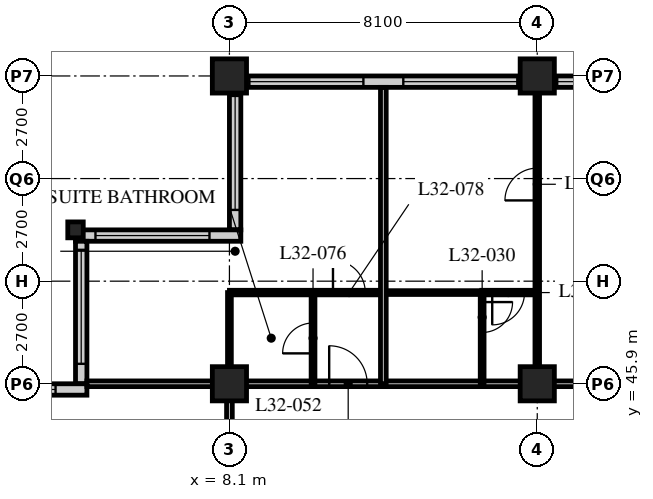
"""IFC4 building model, lengths in metres.
Left out: names, types, materials, properties, quantities, classifications, styles, units other than length and angle.
Written with IfcOpenShell. Run it as: python <this file> out.ifc"""

import sys

from ifc_helpers import new_model, si_unit, direction, frame, frame_2d, origin, origin_2d, place, context, subcontext, project, spatial, rectangle, hollow_rectangle, i_section, extrude, element, fill, save


model = new_model("IFC4")
c1 = context("Model", 3, precision=1e-05, world=origin(), true_north=direction((0.0, 1.0)))
c2 = subcontext(c1, "Body", "Model", "MODEL_VIEW")
j1 = project(units=[si_unit("LENGTHUNIT", "METRE"), si_unit("PLANEANGLEUNIT", "RADIAN")], contexts=[c1])
p1 = place(None, origin())
s1 = spatial("IfcSite", under=j1, at=p1, CompositionType="ELEMENT")
p2 = place(p1, origin())
s2 = spatial("IfcBuilding", under=s1, at=p2, CompositionType="ELEMENT")
p3 = place(p2, frame((0.0, 0.0, 127.2)))
s3 = spatial("IfcBuildingStorey", under=s2, at=p3, CompositionType="ELEMENT", Elevation=127.2)
p4 = place(p3, frame((4.05, 49.95, 0.0), z_axis=(0.0, 0.0, 1.0), x_axis=(1.0, 0.0, 0.0)))
e1 = element("IfcColumn", 1, at=p4, inside=s3, PredefinedType="COLUMN", context=c2, shape_type="SweptSolid", body=[
    extrude(i_section(OverallWidth=0.407, OverallDepth=0.419, WebThickness=0.031, FlangeThickness=0.049, FilletRadius=0.015, at=origin_2d()), origin(), (0.0, 0.0, 1.0), 3.4),
])
for number, where, z_axis, x_axis in (
    (2, (8.1, 45.9, 0.0), (0.0, 0.0, 1.0), (1.0, 0.0, 0.0)),
    (3, (8.1, 54.0, 0.0), (0.0, 0.0, 1.0), (1.0, 0.0, 0.0)),
    (4, (16.2, 45.9, 0.0), (0.0, 0.0, 1.0), (1.0, 0.0, 0.0)),
    (5, (16.2, 54.0, 0.0), (0.0, 0.0, 1.0), (1.0, 0.0, 0.0)),
):
    element("IfcColumn", number, at=place(p3, frame(where, z_axis=z_axis, x_axis=x_axis)), inside=s3, PredefinedType="COLUMN", context=c2, shape_type="SweptSolid", body=[
        extrude(hollow_rectangle(XDim=0.9, YDim=0.9, WallThickness=0.09, at=origin_2d()), origin(), (0.0, 0.0, 1.0), 3.4),
    ])
p5 = place(p3, frame((48.3, 53.85, 0.0), z_axis=(0.0, 0.0, 1.0), x_axis=(-1.0, 0.0, 0.0)))
e6 = element("IfcWall", 6, at=p5, inside=s3, PredefinedType="SOLIDWALL", context=c2, shape_type="SweptSolid", body=[
    extrude(rectangle(XDim=40.2, YDim=0.3, at=frame_2d((20.1, 0.0))), origin(), (0.0, 0.0, 1.0), 3.19),
])
p6 = place(p5, frame((0.225, 0.0, 0.9)))
e7 = element("IfcOpeningElement", 7, at=p6, cuts=e6, PredefinedType="OPENING", context=c2, shape_type="SweptSolid", body=[
    extrude(rectangle(XDim=3.0, YDim=2.0, at=frame_2d((1.5, 1.0))), frame((0.0, 0.16, 0.0), z_axis=(0.0, -1.0, 0.0), x_axis=(1.0, 0.0, 0.0)), (0.0, 0.0, 1.0), 0.32),
])
p7 = place(p5, frame((4.275, 0.0, 0.9)))
e8 = element("IfcOpeningElement", 8, at=p7, cuts=e6, PredefinedType="OPENING", context=c2, shape_type="SweptSolid", body=[
    extrude(rectangle(XDim=3.0, YDim=2.0, at=frame_2d((1.5, 1.0))), frame((0.0, 0.16, 0.0), z_axis=(0.0, -1.0, 0.0), x_axis=(1.0, 0.0, 0.0)), (0.0, 0.0, 1.0), 0.32),
])
p8 = place(p5, frame((8.325, 0.0, 0.9)))
e9 = element("IfcOpeningElement", 9, at=p8, cuts=e6, PredefinedType="OPENING", context=c2, shape_type="SweptSolid", body=[
    extrude(rectangle(XDim=3.0, YDim=2.0, at=frame_2d((1.5, 1.0))), frame((0.0, 0.16, 0.0), z_axis=(0.0, -1.0, 0.0), x_axis=(1.0, 0.0, 0.0)), (0.0, 0.0, 1.0), 0.32),
])
p9 = place(p5, frame((12.375, 0.0, 0.9)))
e10 = element("IfcOpeningElement", 10, at=p9, cuts=e6, PredefinedType="OPENING", context=c2, shape_type="SweptSolid", body=[
    extrude(rectangle(XDim=3.0, YDim=2.0, at=frame_2d((1.5, 1.0))), frame((0.0, 0.16, 0.0), z_axis=(0.0, -1.0, 0.0), x_axis=(1.0, 0.0, 0.0)), (0.0, 0.0, 1.0), 0.32),
])
p10 = place(p5, frame((16.425, 0.0, 0.9)))
e11 = element("IfcOpeningElement", 11, at=p10, cuts=e6, PredefinedType="OPENING", context=c2, shape_type="SweptSolid", body=[
    extrude(rectangle(XDim=3.0, YDim=2.0, at=frame_2d((1.5, 1.0))), frame((0.0, 0.16, 0.0), z_axis=(0.0, -1.0, 0.0), x_axis=(1.0, 0.0, 0.0)), (0.0, 0.0, 1.0), 0.32),
])
p11 = place(p5, frame((20.475, 0.0, 0.9)))
e12 = element("IfcOpeningElement", 12, at=p11, cuts=e6, PredefinedType="OPENING", context=c2, shape_type="SweptSolid", body=[
    extrude(rectangle(XDim=3.0, YDim=2.0, at=frame_2d((1.5, 1.0))), frame((0.0, 0.16, 0.0), z_axis=(0.0, -1.0, 0.0), x_axis=(1.0, 0.0, 0.0)), (0.0, 0.0, 1.0), 0.32),
])
p12 = place(p5, frame((24.525, 0.0, 0.9)))
e13 = element("IfcOpeningElement", 13, at=p12, cuts=e6, PredefinedType="OPENING", context=c2, shape_type="SweptSolid", body=[
    extrude(rectangle(XDim=3.0, YDim=2.0, at=frame_2d((1.5, 1.0))), frame((0.0, 0.16, 0.0), z_axis=(0.0, -1.0, 0.0), x_axis=(1.0, 0.0, 0.0)), (0.0, 0.0, 1.0), 0.32),
])
p13 = place(p5, frame((28.575, 0.0, 0.9)))
e14 = element("IfcOpeningElement", 14, at=p13, cuts=e6, PredefinedType="OPENING", context=c2, shape_type="SweptSolid", body=[
    extrude(rectangle(XDim=3.0, YDim=2.0, at=frame_2d((1.5, 1.0))), frame((0.0, 0.16, 0.0), z_axis=(0.0, -1.0, 0.0), x_axis=(1.0, 0.0, 0.0)), (0.0, 0.0, 1.0), 0.32),
])
p14 = place(p5, frame((32.625, 0.0, 0.9)))
e15 = element("IfcOpeningElement", 15, at=p14, cuts=e6, PredefinedType="OPENING", context=c2, shape_type="SweptSolid", body=[
    extrude(rectangle(XDim=3.0, YDim=2.0, at=frame_2d((1.5, 1.0))), frame((0.0, 0.16, 0.0), z_axis=(0.0, -1.0, 0.0), x_axis=(1.0, 0.0, 0.0)), (0.0, 0.0, 1.0), 0.32),
])
p15 = place(p5, frame((36.675, 0.0, 0.9)))
e16 = element("IfcOpeningElement", 16, at=p15, cuts=e6, PredefinedType="OPENING", context=c2, shape_type="SweptSolid", body=[
    extrude(rectangle(XDim=3.0, YDim=2.0, at=frame_2d((1.5, 1.0))), frame((0.0, 0.16, 0.0), z_axis=(0.0, -1.0, 0.0), x_axis=(1.0, 0.0, 0.0)), (0.0, 0.0, 1.0), 0.32),
])
p16 = place(p3, frame((8.25, 53.7, 0.0), z_axis=(0.0, 0.0, 1.0), x_axis=(0.0, -1.0, 0.0)))
e17 = element("IfcWall", 17, at=p16, inside=s3, PredefinedType="SOLIDWALL", context=c2, shape_type="SweptSolid", body=[
    extrude(rectangle(XDim=3.75, YDim=0.3, at=frame_2d((1.875, 0.0))), origin(), (0.0, 0.0, 1.0), 3.19),
])
p17 = place(p16, frame((0.225, 0.0, 0.9)))
e18 = element("IfcOpeningElement", 18, at=p17, cuts=e17, PredefinedType="OPENING", context=c2, shape_type="SweptSolid", body=[
    extrude(rectangle(XDim=3.0, YDim=1.5, at=frame_2d((1.5, 0.75))), frame((0.0, 0.16, 0.0), z_axis=(0.0, -1.0, 0.0), x_axis=(1.0, 0.0, 0.0)), (0.0, 0.0, 1.0), 0.32),
])
p18 = place(p3, frame((8.4, 49.8, 0.0), z_axis=(0.0, 0.0, 1.0), x_axis=(-1.0, 0.0, 0.0)))
e19 = element("IfcWall", 19, at=p18, inside=s3, PredefinedType="SOLIDWALL", context=c2, shape_type="SweptSolid", body=[
    extrude(rectangle(XDim=4.35, YDim=0.3, at=frame_2d((2.175, 0.0))), origin(), (0.0, 0.0, 1.0), 3.19),
])
p19 = place(p18, frame((0.825, 0.0, 0.9)))
e20 = element("IfcOpeningElement", 20, at=p19, cuts=e19, PredefinedType="OPENING", context=c2, shape_type="SweptSolid", body=[
    extrude(rectangle(XDim=3.0, YDim=1.5, at=frame_2d((1.5, 0.75))), frame((0.0, 0.16, 0.0), z_axis=(0.0, -1.0, 0.0), x_axis=(1.0, 0.0, 0.0)), (0.0, 0.0, 1.0), 0.32),
])
p20 = place(p3, frame((4.2, 49.65, 0.0), z_axis=(0.0, 0.0, 1.0), x_axis=(0.0, -1.0, 0.0)))
e21 = element("IfcWall", 21, at=p20, inside=s3, PredefinedType="SOLIDWALL", context=c2, shape_type="SweptSolid", body=[
    extrude(rectangle(XDim=3.75, YDim=0.3, at=frame_2d((1.875, 0.0))), origin(), (0.0, 0.0, 1.0), 3.19),
])
p21 = place(p20, frame((0.225, 0.0, 0.9)))
e22 = element("IfcOpeningElement", 22, at=p21, cuts=e21, PredefinedType="OPENING", context=c2, shape_type="SweptSolid", body=[
    extrude(rectangle(XDim=3.0, YDim=1.5, at=frame_2d((1.5, 0.75))), frame((0.0, 0.16, 0.0), z_axis=(0.0, -1.0, 0.0), x_axis=(1.0, 0.0, 0.0)), (0.0, 0.0, 1.0), 0.32),
])
p22 = place(p3, frame((4.35, 45.75, 0.0), z_axis=(0.0, 0.0, 1.0), x_axis=(-1.0, 0.0, 0.0)))
e23 = element("IfcWall", 23, at=p22, inside=s3, PredefinedType="SOLIDWALL", context=c2, shape_type="SweptSolid", body=[
    extrude(rectangle(XDim=4.35, YDim=0.3, at=frame_2d((2.175, 0.0))), origin(), (0.0, 0.0, 1.0), 3.19),
])
p23 = place(p22, frame((0.825, 0.0, 0.9)))
e24 = element("IfcOpeningElement", 24, at=p23, cuts=e23, PredefinedType="OPENING", context=c2, shape_type="SweptSolid", body=[
    extrude(rectangle(XDim=3.0, YDim=1.5, at=frame_2d((1.5, 0.75))), frame((0.0, 0.16, 0.0), z_axis=(0.0, -1.0, 0.0), x_axis=(1.0, 0.0, 0.0)), (0.0, 0.0, 1.0), 0.32),
])
p24 = place(p3, frame((8.1, 45.9, 0.0), z_axis=(0.0, 0.0, 1.0), x_axis=(1.0, 0.0, 0.0)))
e25 = element("IfcWall", 25, at=p24, inside=s3, PredefinedType="PARTITIONING", context=c2, shape_type="SweptSolid", body=[
    extrude(rectangle(XDim=40.5, YDim=0.15, at=frame_2d((20.25, 0.0))), origin(), (0.0, 0.0, 1.0), 2.578),
])
p25 = place(p24, frame((9.625, 0.0, 0.0)))
e26 = element("IfcOpeningElement", 26, at=p25, cuts=e25, PredefinedType="OPENING", context=c2, shape_type="SweptSolid", body=[
    extrude(rectangle(XDim=1.0, YDim=2.1, at=frame_2d((0.5, 1.05))), frame((0.0, 0.085, 0.0), z_axis=(0.0, -1.0, 0.0), x_axis=(1.0, 0.0, 0.0)), (0.0, 0.0, 1.0), 0.17),
])
p26 = place(p24, frame((21.65, 0.0, 0.0)))
e27 = element("IfcOpeningElement", 27, at=p26, cuts=e25, PredefinedType="OPENING", context=c2, shape_type="SweptSolid", body=[
    extrude(rectangle(XDim=1.0, YDim=2.1, at=frame_2d((0.5, 1.05))), frame((0.0, 0.085, 0.0), z_axis=(0.0, -1.0, 0.0), x_axis=(1.0, 0.0, 0.0)), (0.0, 0.0, 1.0), 0.17),
])
p27 = place(p24, frame((26.75, 0.0, 0.0)))
e28 = element("IfcOpeningElement", 28, at=p27, cuts=e25, PredefinedType="OPENING", context=c2, shape_type="SweptSolid", body=[
    extrude(rectangle(XDim=1.0, YDim=2.1, at=frame_2d((0.5, 1.05))), frame((0.0, 0.085, 0.0), z_axis=(0.0, -1.0, 0.0), x_axis=(1.0, 0.0, 0.0)), (0.0, 0.0, 1.0), 0.17),
])
p28 = place(p24, frame((28.95, 0.0, 0.0)))
e29 = element("IfcOpeningElement", 29, at=p28, cuts=e25, PredefinedType="OPENING", context=c2, shape_type="SweptSolid", body=[
    extrude(rectangle(XDim=1.0, YDim=2.1, at=frame_2d((0.5, 1.05))), frame((0.0, 0.085, 0.0), z_axis=(0.0, -1.0, 0.0), x_axis=(1.0, 0.0, 0.0)), (0.0, 0.0, 1.0), 0.17),
])
p29 = place(p24, frame((34.85, 0.0, 0.0)))
e30 = element("IfcOpeningElement", 30, at=p29, cuts=e25, PredefinedType="OPENING", context=c2, shape_type="SweptSolid", body=[
    extrude(rectangle(XDim=1.0, YDim=2.1, at=frame_2d((0.5, 1.05))), frame((0.0, 0.085, 0.0), z_axis=(0.0, -1.0, 0.0), x_axis=(1.0, 0.0, 0.0)), (0.0, 0.0, 1.0), 0.17),
])
p30 = place(p24, frame((36.875, 0.0, 0.0)))
e31 = element("IfcOpeningElement", 31, at=p30, cuts=e25, PredefinedType="OPENING", context=c2, shape_type="SweptSolid", body=[
    extrude(rectangle(XDim=1.0, YDim=2.1, at=frame_2d((0.5, 1.05))), frame((0.0, 0.085, 0.0), z_axis=(0.0, -1.0, 0.0), x_axis=(1.0, 0.0, 0.0)), (0.0, 0.0, 1.0), 0.17),
])
p31 = place(p24, frame((2.625, 0.0, 0.0)))
e32 = element("IfcOpeningElement", 32, at=p31, cuts=e25, PredefinedType="OPENING", context=c2, shape_type="SweptSolid", body=[
    extrude(rectangle(XDim=1.0, YDim=2.1, at=frame_2d((0.5, 1.05))), frame((0.0, 0.085, 0.0), z_axis=(0.0, -1.0, 0.0), x_axis=(1.0, 0.0, 0.0)), (0.0, 0.0, 1.0), 0.17),
])
p32 = place(p3, frame((8.1, 21.6, 0.0), z_axis=(0.0, 0.0, 1.0), x_axis=(0.0, 1.0, 0.0)))
e33 = element("IfcWall", 33, at=p32, inside=s3, PredefinedType="PARTITIONING", context=c2, shape_type="SweptSolid", body=[
    extrude(rectangle(XDim=24.3, YDim=0.15, at=frame_2d((12.15, 0.0))), origin(), (0.0, 0.0, 1.0), 2.578),
])
p33 = place(p32, frame((5.45, 0.0, 0.0)))
e34 = element("IfcOpeningElement", 34, at=p33, cuts=e33, PredefinedType="OPENING", context=c2, shape_type="SweptSolid", body=[
    extrude(rectangle(XDim=1.0, YDim=2.1, at=frame_2d((0.5, 1.05))), frame((0.0, 0.085, 0.0), z_axis=(0.0, -1.0, 0.0), x_axis=(1.0, 0.0, 0.0)), (0.0, 0.0, 1.0), 0.17),
])
p34 = place(p32, frame((10.0, 0.0, 0.0)))
e35 = element("IfcOpeningElement", 35, at=p34, cuts=e33, PredefinedType="OPENING", context=c2, shape_type="SweptSolid", body=[
    extrude(rectangle(XDim=1.0, YDim=2.1, at=frame_2d((0.5, 1.05))), frame((0.0, 0.085, 0.0), z_axis=(0.0, -1.0, 0.0), x_axis=(1.0, 0.0, 0.0)), (0.0, 0.0, 1.0), 0.17),
])
p35 = place(p32, frame((21.65, 0.0, 0.0)))
e36 = element("IfcOpeningElement", 36, at=p35, cuts=e33, PredefinedType="OPENING", context=c2, shape_type="SweptSolid", body=[
    extrude(rectangle(XDim=1.0, YDim=2.1, at=frame_2d((0.5, 1.05))), frame((0.0, 0.085, 0.0), z_axis=(0.0, -1.0, 0.0), x_axis=(1.0, 0.0, 0.0)), (0.0, 0.0, 1.0), 0.17),
])
p36 = place(p3, frame((12.15, 48.3, 0.0), z_axis=(0.0, 0.0, 1.0), x_axis=(1.0, 0.0, 0.0)))
e37 = element("IfcWall", 37, at=p36, inside=s3, PredefinedType="PARTITIONING", context=c2, shape_type="SweptSolid", body=[
    extrude(rectangle(XDim=2.6, YDim=0.1, at=frame_2d((1.3, 0.0))), origin(), (0.0, 0.0, 1.0), 3.19),
])
p37 = place(p3, frame((14.75, 45.9, 0.0), z_axis=(0.0, 0.0, 1.0), x_axis=(0.0, 1.0, 0.0)))
e38 = element("IfcWall", 38, at=p37, inside=s3, PredefinedType="PARTITIONING", context=c2, shape_type="SweptSolid", body=[
    extrude(rectangle(XDim=2.4, YDim=0.1, at=frame_2d((1.2, 0.0))), origin(), (0.0, 0.0, 1.0), 3.19),
])
p38 = place(p37, frame((1.35, 0.0, 0.0)))
e39 = element("IfcOpeningElement", 39, at=p38, cuts=e38, PredefinedType="OPENING", context=c2, shape_type="SweptSolid", body=[
    extrude(rectangle(XDim=0.8, YDim=2.1, at=frame_2d((0.4, 1.05))), frame((0.0, 0.06, 0.0), z_axis=(0.0, -1.0, 0.0), x_axis=(1.0, 0.0, 0.0)), (0.0, 0.0, 1.0), 0.12),
])
p39 = place(p3, frame((16.2, 45.9, 0.0), z_axis=(0.0, 0.0, 1.0), x_axis=(0.0, 1.0, 0.0)))
e40 = element("IfcWall", 40, at=p39, inside=s3, PredefinedType="PARTITIONING", context=c2, shape_type="SweptSolid", body=[
    extrude(rectangle(XDim=7.8, YDim=0.12, at=frame_2d((3.9, 0.0))), origin(), (0.0, 0.0, 1.0), 2.578),
])
p40 = place(p39, frame((4.825, 0.0, 0.0)))
e41 = element("IfcOpeningElement", 41, at=p40, cuts=e40, PredefinedType="OPENING", context=c2, shape_type="SweptSolid", body=[
    extrude(rectangle(XDim=0.85, YDim=2.1, at=frame_2d((0.425, 1.05))), frame((0.0, 0.07, 0.0), z_axis=(0.0, -1.0, 0.0), x_axis=(1.0, 0.0, 0.0)), (0.0, 0.0, 1.0), 0.14),
])
p41 = place(p3, frame((8.1, 48.3, 0.0), z_axis=(0.0, 0.0, 1.0), x_axis=(1.0, 0.0, 0.0)))
e42 = element("IfcWall", 42, at=p41, inside=s3, PredefinedType="PARTITIONING", context=c2, shape_type="SweptSolid", body=[
    extrude(rectangle(XDim=4.05, YDim=0.12, at=frame_2d((2.025, 0.0))), origin(), (0.0, 0.0, 1.0), 3.19),
])
p42 = place(p41, frame((2.725, 0.0, 0.0)))
e43 = element("IfcOpeningElement", 43, at=p42, cuts=e42, PredefinedType="OPENING", context=c2, shape_type="SweptSolid", body=[
    extrude(rectangle(XDim=0.85, YDim=2.1, at=frame_2d((0.425, 1.05))), frame((0.0, 0.07, 0.0), z_axis=(0.0, -1.0, 0.0), x_axis=(1.0, 0.0, 0.0)), (0.0, 0.0, 1.0), 0.14),
])
p43 = place(p3, frame((10.3, 45.9, 0.0), z_axis=(0.0, 0.0, 1.0), x_axis=(0.0, 1.0, 0.0)))
e44 = element("IfcWall", 44, at=p43, inside=s3, PredefinedType="PARTITIONING", context=c2, shape_type="SweptSolid", body=[
    extrude(rectangle(XDim=2.4, YDim=0.1, at=frame_2d((1.2, 0.0))), origin(), (0.0, 0.0, 1.0), 3.19),
])
p44 = place(p43, frame((0.8, 0.0, 0.0)))
e45 = element("IfcOpeningElement", 45, at=p44, cuts=e44, PredefinedType="OPENING", context=c2, shape_type="SweptSolid", body=[
    extrude(rectangle(XDim=0.8, YDim=2.1, at=frame_2d((0.4, 1.05))), frame((0.0, 0.06, 0.0), z_axis=(0.0, -1.0, 0.0), x_axis=(1.0, 0.0, 0.0)), (0.0, 0.0, 1.0), 0.12),
])
p45 = place(p3, frame((8.1, 45.9, 0.0), z_axis=(0.0, 0.0, 1.0), x_axis=(0.0, 1.0, 0.0)))
e46 = element("IfcWall", 46, at=p45, inside=s3, PredefinedType="PARTITIONING", context=c2, shape_type="SweptSolid", body=[
    extrude(rectangle(XDim=2.4, YDim=0.1, at=frame_2d((1.2, 0.0))), origin(), (0.0, 0.0, 1.0), 2.578),
])
p46 = place(p3, frame((4.35, 45.9, 0.0), z_axis=(0.0, 0.0, 1.0), x_axis=(1.0, 0.0, 0.0)))
e47 = element("IfcWall", 47, at=p46, inside=s3, PredefinedType="PARTITIONING", context=c2, shape_type="SweptSolid", body=[
    extrude(rectangle(XDim=3.75, YDim=0.15, at=frame_2d((1.875, 0.0))), origin(), (0.0, 0.0, 1.0), 2.578),
])
p47 = place(p3, frame((12.15, 45.9, 0.0), z_axis=(0.0, 0.0, 1.0), x_axis=(0.0, 1.0, 0.0)))
e48 = element("IfcWall", 48, at=p47, inside=s3, PredefinedType="PARTITIONING", context=c2, shape_type="SweptSolid", body=[
    extrude(rectangle(XDim=7.8, YDim=0.15, at=frame_2d((3.9, 0.0))), origin(), (0.0, 0.0, 1.0), 3.19),
])
p48 = place(p3, frame((14.74, 48.3, 0.0), z_axis=(0.0, 0.0, 1.0), x_axis=(1.0, 0.0, 0.0)))
e49 = element("IfcWall", 49, at=p48, inside=s3, PredefinedType="PARTITIONING", context=c2, shape_type="SweptSolid", body=[
    extrude(rectangle(XDim=1.46, YDim=0.12, at=frame_2d((0.73, 0.0))), origin(), (0.0, 0.0, 1.0), 3.19),
])
p49 = place(p48, frame((0.275, 0.0, 0.0)))
e50 = element("IfcOpeningElement", 50, at=p49, cuts=e49, PredefinedType="OPENING", context=c2, shape_type="SweptSolid", body=[
    extrude(rectangle(XDim=0.85, YDim=2.1, at=frame_2d((0.425, 1.05))), frame((0.0, 0.07, 0.0), z_axis=(0.0, -1.0, 0.0), x_axis=(1.0, 0.0, 0.0)), (0.0, 0.0, 1.0), 0.14),
])
p50 = place(p13, origin())
e51 = element("IfcWindow", 51, at=p50, inside=s3, PartitioningType="SINGLE_PANEL", PredefinedType="WINDOW", context=c2, shape_type="SweptSolid", body=[
    extrude(rectangle(XDim=3.0, YDim=2.0, at=frame_2d((1.5, 1.0))), frame((0.0, 0.03, 0.0), z_axis=(0.0, -1.0, 0.0), x_axis=(1.0, 0.0, 0.0)), (0.0, 0.0, 1.0), 0.06),
])
fill(e14, e51)
p51 = place(p14, origin())
e52 = element("IfcWindow", 52, at=p51, inside=s3, PartitioningType="SINGLE_PANEL", PredefinedType="WINDOW", context=c2, shape_type="SweptSolid", body=[
    extrude(rectangle(XDim=3.0, YDim=2.0, at=frame_2d((1.5, 1.0))), frame((0.0, 0.03, 0.0), z_axis=(0.0, -1.0, 0.0), x_axis=(1.0, 0.0, 0.0)), (0.0, 0.0, 1.0), 0.06),
])
fill(e15, e52)
p52 = place(p15, origin())
e53 = element("IfcWindow", 53, at=p52, inside=s3, PartitioningType="SINGLE_PANEL", PredefinedType="WINDOW", context=c2, shape_type="SweptSolid", body=[
    extrude(rectangle(XDim=3.0, YDim=2.0, at=frame_2d((1.5, 1.0))), frame((0.0, 0.03, 0.0), z_axis=(0.0, -1.0, 0.0), x_axis=(1.0, 0.0, 0.0)), (0.0, 0.0, 1.0), 0.06),
])
fill(e16, e53)
p53 = place(p17, origin())
e54 = element("IfcWindow", 54, at=p53, inside=s3, PartitioningType="SINGLE_PANEL", PredefinedType="WINDOW", context=c2, shape_type="SweptSolid", body=[
    extrude(rectangle(XDim=3.0, YDim=1.5, at=frame_2d((1.5, 0.75))), frame((0.0, 0.03, 0.0), z_axis=(0.0, -1.0, 0.0), x_axis=(1.0, 0.0, 0.0)), (0.0, 0.0, 1.0), 0.06),
])
fill(e18, e54)
p54 = place(p19, origin())
e55 = element("IfcWindow", 55, at=p54, inside=s3, PartitioningType="SINGLE_PANEL", PredefinedType="WINDOW", context=c2, shape_type="SweptSolid", body=[
    extrude(rectangle(XDim=3.0, YDim=1.5, at=frame_2d((1.5, 0.75))), frame((0.0, 0.03, 0.0), z_axis=(0.0, -1.0, 0.0), x_axis=(1.0, 0.0, 0.0)), (0.0, 0.0, 1.0), 0.06),
])
fill(e20, e55)
p55 = place(p21, origin())
e56 = element("IfcWindow", 56, at=p55, inside=s3, PartitioningType="SINGLE_PANEL", PredefinedType="WINDOW", context=c2, shape_type="SweptSolid", body=[
    extrude(rectangle(XDim=3.0, YDim=1.5, at=frame_2d((1.5, 0.75))), frame((0.0, 0.03, 0.0), z_axis=(0.0, -1.0, 0.0), x_axis=(1.0, 0.0, 0.0)), (0.0, 0.0, 1.0), 0.06),
])
fill(e22, e56)
p56 = place(p23, origin())
e57 = element("IfcWindow", 57, at=p56, inside=s3, PartitioningType="SINGLE_PANEL", PredefinedType="WINDOW", context=c2, shape_type="SweptSolid", body=[
    extrude(rectangle(XDim=3.0, YDim=1.5, at=frame_2d((1.5, 0.75))), frame((0.0, 0.03, 0.0), z_axis=(0.0, -1.0, 0.0), x_axis=(1.0, 0.0, 0.0)), (0.0, 0.0, 1.0), 0.06),
])
fill(e24, e57)
p57 = place(p38, origin())
e58 = element("IfcDoor", 58, at=p57, inside=s3, OperationType="SINGLE_SWING_LEFT", PredefinedType="DOOR", context=c2, shape_type="SweptSolid", body=[
    extrude(rectangle(XDim=0.8, YDim=2.1, at=frame_2d((0.4, 1.05))), frame((0.0, 0.025, 0.0), z_axis=(0.0, -1.0, 0.0), x_axis=(1.0, 0.0, 0.0)), (0.0, 0.0, 1.0), 0.05),
])
fill(e39, e58)
p58 = place(p40, origin())
e59 = element("IfcDoor", 59, at=p58, inside=s3, OperationType="SINGLE_SWING_LEFT", PredefinedType="DOOR", context=c2, shape_type="SweptSolid", body=[
    extrude(rectangle(XDim=0.85, YDim=2.1, at=frame_2d((0.425, 1.05))), frame((0.0, 0.025, 0.0), z_axis=(0.0, -1.0, 0.0), x_axis=(1.0, 0.0, 0.0)), (0.0, 0.0, 1.0), 0.05),
])
fill(e41, e59)
p59 = place(p44, origin())
e60 = element("IfcDoor", 60, at=p59, inside=s3, OperationType="SINGLE_SWING_LEFT", PredefinedType="DOOR", context=c2, shape_type="SweptSolid", body=[
    extrude(rectangle(XDim=0.8, YDim=2.1, at=frame_2d((0.4, 1.05))), frame((0.0, 0.025, 0.0), z_axis=(0.0, -1.0, 0.0), x_axis=(1.0, 0.0, 0.0)), (0.0, 0.0, 1.0), 0.05),
])
fill(e45, e60)
p60 = place(p31, origin())
e61 = element("IfcDoor", 61, at=p60, inside=s3, OperationType="SINGLE_SWING_LEFT", PredefinedType="DOOR", context=c2, shape_type="SweptSolid", body=[
    extrude(rectangle(XDim=1.0, YDim=2.1, at=frame_2d((0.5, 1.05))), frame((0.0, 0.025, 0.0), z_axis=(0.0, -1.0, 0.0), x_axis=(1.0, 0.0, 0.0)), (0.0, 0.0, 1.0), 0.05),
])
fill(e32, e61)
p61 = place(p42, origin())
e62 = element("IfcDoor", 62, at=p61, inside=s3, OperationType="SINGLE_SWING_LEFT", PredefinedType="DOOR", context=c2, shape_type="SweptSolid", body=[
    extrude(rectangle(XDim=0.85, YDim=2.1, at=frame_2d((0.425, 1.05))), frame((0.0, 0.025, 0.0), z_axis=(0.0, -1.0, 0.0), x_axis=(1.0, 0.0, 0.0)), (0.0, 0.0, 1.0), 0.05),
])
fill(e43, e62)
p62 = place(p49, origin())
e63 = element("IfcDoor", 63, at=p62, inside=s3, OperationType="SINGLE_SWING_RIGHT", PredefinedType="DOOR", context=c2, shape_type="SweptSolid", body=[
    extrude(rectangle(XDim=0.85, YDim=2.1, at=frame_2d((0.425, 1.05))), frame((0.0, 0.025, 0.0), z_axis=(0.0, -1.0, 0.0), x_axis=(1.0, 0.0, 0.0)), (0.0, 0.0, 1.0), 0.05),
])
fill(e50, e63)
save(model, sys.argv[1])
